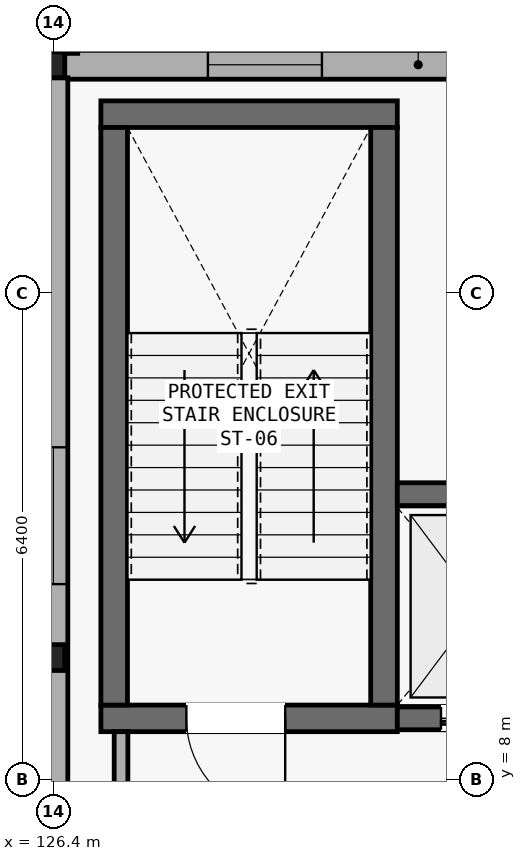
"""IFC4 building model, lengths in metres.
Left out: names, types, materials, properties, quantities, classifications, styles, units other than length and angle.
Written with IfcOpenShell. Run it as: python <this file> out.ifc"""

import sys

from ifc_helpers import new_model, si_unit, direction, frame, frame_2d, origin, origin_2d, place, context, subcontext, project, spatial, rectangle, i_section, extrude, element, fill, save


model = new_model("IFC4")
c1 = context("Model", 3, precision=1e-05, world=origin(), true_north=direction((0.0, 1.0)))
c2 = subcontext(c1, "Body", "Model", "MODEL_VIEW")
j1 = project(units=[si_unit("LENGTHUNIT", "METRE"), si_unit("PLANEANGLEUNIT", "RADIAN")], contexts=[c1])
p1 = place(None, origin())
s1 = spatial("IfcSite", under=j1, at=p1, CompositionType="ELEMENT")
p2 = place(p1, origin())
s2 = spatial("IfcBuilding", under=s1, at=p2, CompositionType="ELEMENT")
p3 = place(p2, frame((0.0, 0.0, 9.45)))
s3 = spatial("IfcBuildingStorey", under=s2, at=p3, CompositionType="ELEMENT", Elevation=9.45)
for number, where, z_axis, x_axis in (
    (1, (126.4, 9.6, 0.0), (0.0, 0.0, 1.0), (1.0, 0.0, 0.0)),
    (2, (126.4, 17.4, 0.0), (0.0, 0.0, 1.0), (1.0, 0.0, 0.0)),
):
    element("IfcColumn", number, at=place(p3, frame(where, z_axis=z_axis, x_axis=x_axis)), inside=s3, PredefinedType="COLUMN", context=c2, shape_type="SweptSolid", body=[
        extrude(i_section(OverallWidth=0.3, OverallDepth=0.34, WebThickness=0.012, FlangeThickness=0.021, FilletRadius=0.027, at=origin_2d()), origin(), (0.0, 0.0, 1.0), 4.2),
    ])
p4 = place(p3, frame((126.408, 17.4, 0.0), z_axis=(0.0, 0.0, 1.0), x_axis=(1.0, 0.0, 0.0)))
e3 = element("IfcWall", 3, at=p4, inside=s3, PredefinedType="SOLIDWALL", context=c2, shape_type="SweptSolid", body=[
    extrude(rectangle(XDim=9.584, YDim=0.38, at=frame_2d((4.792, 0.0))), origin(), (0.0, 0.0, 1.0), 3.64),
])
p5 = place(p4, frame((2.025, 0.0, 1.7)))
e4 = element("IfcOpeningElement", 4, at=p5, cuts=e3, PredefinedType="OPENING", context=c2, shape_type="SweptSolid", body=[
    extrude(rectangle(XDim=1.5, YDim=0.7, at=frame_2d((0.75, 0.35))), frame((0.0, 0.2, 0.0), z_axis=(0.0, -1.0, 0.0), x_axis=(1.0, 0.0, 0.0)), (0.0, 0.0, 1.0), 0.4),
])
p6 = place(p4, frame((5.509, 0.0, 1.7)))
e5 = element("IfcOpeningElement", 5, at=p6, cuts=e3, PredefinedType="OPENING", context=c2, shape_type="SweptSolid", body=[
    extrude(rectangle(XDim=1.5, YDim=0.7, at=frame_2d((0.75, 0.35))), frame((0.0, 0.2, 0.0), z_axis=(0.0, -1.0, 0.0), x_axis=(1.0, 0.0, 0.0)), (0.0, 0.0, 1.0), 0.4),
])
p7 = place(p3, frame((126.4, 0.172, 0.0), z_axis=(0.0, 0.0, 1.0), x_axis=(0.0, 1.0, 0.0)))
e6 = element("IfcWall", 6, at=p7, inside=s3, PredefinedType="SOLIDWALL", context=c2, shape_type="SweptSolid", body=[
    extrude(rectangle(XDim=17.056, YDim=0.38, at=frame_2d((8.528, 0.0))), origin(), (0.0, 0.0, 1.0), 3.51),
])
p8 = place(p7, frame((5.411, 0.0, 1.7)))
e7 = element("IfcOpeningElement", 7, at=p8, cuts=e6, PredefinedType="OPENING", context=c2, shape_type="SweptSolid", body=[
    extrude(rectangle(XDim=1.8, YDim=0.85, at=frame_2d((0.9, 0.425))), frame((0.0, 0.2, 0.0), z_axis=(0.0, -1.0, 0.0), x_axis=(1.0, 0.0, 0.0)), (0.0, 0.0, 1.0), 0.4),
])
p9 = place(p7, frame((10.395, 0.0, 1.7)))
e8 = element("IfcOpeningElement", 8, at=p9, cuts=e6, PredefinedType="OPENING", context=c2, shape_type="SweptSolid", body=[
    extrude(rectangle(XDim=1.8, YDim=0.85, at=frame_2d((0.9, 0.425))), frame((0.0, 0.2, 0.0), z_axis=(0.0, -1.0, 0.0), x_axis=(1.0, 0.0, 0.0)), (0.0, 0.0, 1.0), 0.4),
])
p10 = place(p3, frame((126.6, 22.2, 0.0), z_axis=(0.0, 0.0, 1.0), x_axis=(0.0, -1.0, 0.0)))
e9 = element("IfcWall", 9, at=p10, inside=s3, PredefinedType="PARAPET", context=c2, shape_type="SweptSolid", body=[
    extrude(rectangle(XDim=4.65, YDim=0.24, at=frame_2d((2.325, 0.0))), origin(), (0.0, 0.0, 1.0), 1.1),
])
p11 = place(p3, frame((127.025, 8.8, 0.0), z_axis=(0.0, 0.0, 1.0), x_axis=(1.0, 0.0, 0.0)))
e10 = element("IfcWall", 10, at=p11, inside=s3, PredefinedType="SHEAR", context=c2, shape_type="SweptSolid", body=[
    extrude(rectangle(XDim=3.9, YDim=0.35, at=frame_2d((1.95, 0.0))), origin(), (0.0, 0.0, 1.0), 3.97),
])
p12 = place(p11, frame((1.125, 0.0, 0.0)))
e11 = element("IfcOpeningElement", 11, at=p12, cuts=e10, PredefinedType="OPENING", context=c2, shape_type="SweptSolid", body=[
    extrude(rectangle(XDim=1.3, YDim=2.15, at=frame_2d((0.65, 1.075))), frame((0.0, 0.185, 0.0), z_axis=(0.0, -1.0, 0.0), x_axis=(1.0, 0.0, 0.0)), (0.0, 0.0, 1.0), 0.37),
])
p13 = place(p3, frame((127.025, 16.75, 0.0), z_axis=(0.0, 0.0, 1.0), x_axis=(1.0, 0.0, 0.0)))
e12 = element("IfcWall", 12, at=p13, inside=s3, PredefinedType="SHEAR", context=c2, shape_type="SweptSolid", body=[
    extrude(rectangle(XDim=3.9, YDim=0.35, at=frame_2d((1.95, 0.0))), origin(), (0.0, 0.0, 1.0), 3.97),
])
for number, where, z_axis, x_axis in (
    (13, (127.2, 8.975, 0.0), (0.0, 0.0, 1.0), (0.0, 1.0, 0.0)),
    (14, (130.75, 8.975, 0.0), (0.0, 0.0, 1.0), (0.0, 1.0, 0.0)),
):
    element("IfcWall", number, at=place(p3, frame(where, z_axis=z_axis, x_axis=x_axis)), inside=s3, PredefinedType="SHEAR", context=c2, shape_type="SweptSolid", body=[
        extrude(rectangle(XDim=7.6, YDim=0.35, at=frame_2d((3.8, 0.0))), origin(), (0.0, 0.0, 1.0), 3.97),
    ])
p14 = place(p3, frame((130.925, 8.8, 0.0), z_axis=(0.0, 0.0, 1.0), x_axis=(1.0, 0.0, 0.0)))
e15 = element("IfcWall", 15, at=p14, inside=s3, PredefinedType="SHEAR", context=c2, shape_type="SweptSolid", body=[
    extrude(rectangle(XDim=2.5, YDim=0.3, at=frame_2d((1.25, 0.0))), origin(), (0.0, 0.0, 1.0), 3.97),
])
p15 = place(p14, frame((0.575, 0.0, 0.0)))
e16 = element("IfcOpeningElement", 16, at=p15, cuts=e15, PredefinedType="OPENING", context=c2, shape_type="SweptSolid", body=[
    extrude(rectangle(XDim=1.35, YDim=2.15, at=frame_2d((0.675, 1.075))), frame((0.0, 0.16, 0.0), z_axis=(0.0, -1.0, 0.0), x_axis=(1.0, 0.0, 0.0)), (0.0, 0.0, 1.0), 0.32),
])
p16 = place(p3, frame((130.925, 11.75, 0.0), z_axis=(0.0, 0.0, 1.0), x_axis=(1.0, 0.0, 0.0)))
e17 = element("IfcWall", 17, at=p16, inside=s3, PredefinedType="SHEAR", context=c2, shape_type="SweptSolid", body=[
    extrude(rectangle(XDim=2.5, YDim=0.3, at=frame_2d((1.25, 0.0))), origin(), (0.0, 0.0, 1.0), 3.97),
])
p17 = place(p3, frame((127.29, 5.25, 0.0), z_axis=(0.0, 0.0, 1.0), x_axis=(0.0, 1.0, 0.0)))
e18 = element("IfcWall", 18, at=p17, inside=s3, PredefinedType="PARTITIONING", context=c2, shape_type="SweptSolid", body=[
    extrude(rectangle(XDim=3.375, YDim=0.18, at=frame_2d((1.688, 0.0))), origin(), (0.0, 0.0, 1.0), 3.97),
])
p18 = place(p5, origin())
e19 = element("IfcWindow", 19, at=p18, inside=s3, PartitioningType="SINGLE_PANEL", PredefinedType="WINDOW", context=c2, shape_type="SweptSolid", body=[
    extrude(rectangle(XDim=1.5, YDim=0.7, at=frame_2d((0.75, 0.35))), frame((0.0, 0.03, 0.0), z_axis=(0.0, -1.0, 0.0), x_axis=(1.0, 0.0, 0.0)), (0.0, 0.0, 1.0), 0.06),
])
fill(e4, e19)
p19 = place(p9, origin())
e20 = element("IfcWindow", 20, at=p19, inside=s3, PartitioningType="SINGLE_PANEL", PredefinedType="WINDOW", context=c2, shape_type="SweptSolid", body=[
    extrude(rectangle(XDim=1.8, YDim=0.85, at=frame_2d((0.9, 0.425))), frame((0.0, 0.03, 0.0), z_axis=(0.0, -1.0, 0.0), x_axis=(1.0, 0.0, 0.0)), (0.0, 0.0, 1.0), 0.06),
])
fill(e8, e20)
p20 = place(p12, frame((1.3, 0.0, 0.0), z_axis=(0.0, 0.0, 1.0), x_axis=(-1.0, 0.0, 0.0)))
e21 = element("IfcDoor", 21, at=p20, inside=s3, OperationType="SINGLE_SWING_RIGHT", PredefinedType="DOOR", context=c2, shape_type="SweptSolid", body=[
    extrude(rectangle(XDim=1.3, YDim=2.15, at=frame_2d((0.65, 1.075))), frame((0.0, 0.025, 0.0), z_axis=(0.0, -1.0, 0.0), x_axis=(1.0, 0.0, 0.0)), (0.0, 0.0, 1.0), 0.05),
])
fill(e11, e21)
p21 = place(p15, frame((1.35, 0.0, 0.0), z_axis=(0.0, 0.0, 1.0), x_axis=(-1.0, 0.0, 0.0)))
e22 = element("IfcDoor", 22, at=p21, inside=s3, OperationType="SLIDING_TO_RIGHT", PredefinedType="DOOR", context=c2, shape_type="SweptSolid", body=[
    extrude(rectangle(XDim=1.35, YDim=2.15, at=frame_2d((0.675, 1.075))), frame((0.0, 0.025, 0.0), z_axis=(0.0, -1.0, 0.0), x_axis=(1.0, 0.0, 0.0)), (0.0, 0.0, 1.0), 0.05),
])
fill(e16, e22)
save(model, sys.argv[1])
